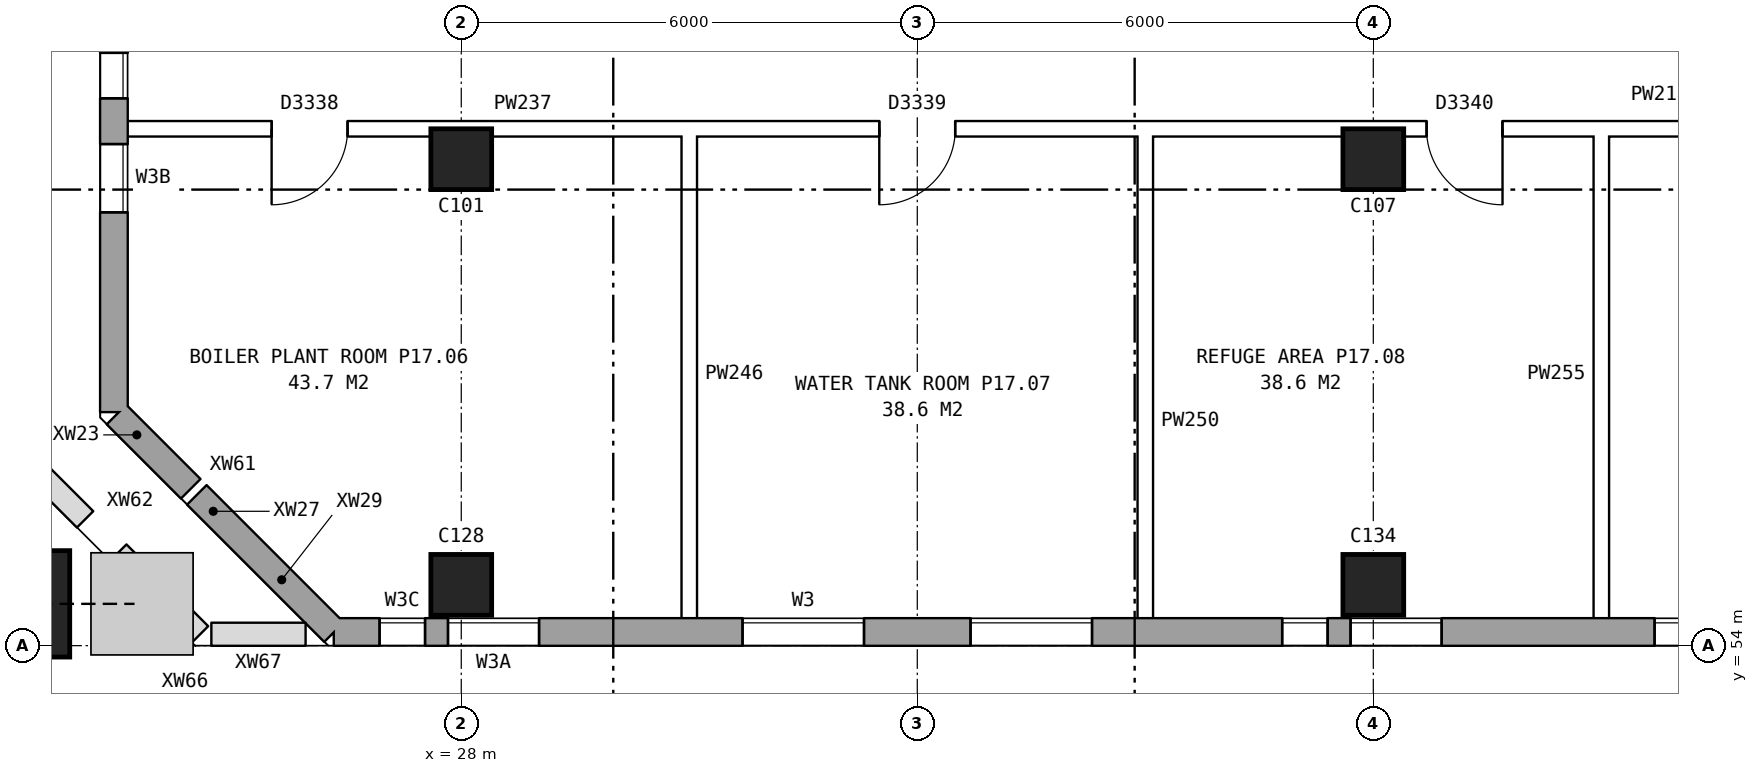
"""IFC4 building model, lengths in metres.
Left out: names, types, materials, properties, quantities, classifications, styles, units other than length and angle.
Written with IfcOpenShell. Run it as: python <this file> out.ifc"""

import sys

from ifc_helpers import new_model, si_unit, direction, frame, frame_2d, origin, origin_2d, place, context, subcontext, project, spatial, rectangle, hollow_rectangle, extrude, element, fill, save


model = new_model("IFC4")
c1 = context("Model", 3, precision=1e-05, world=origin(), true_north=direction((0.0, 1.0)))
c2 = subcontext(c1, "Body", "Model", "MODEL_VIEW")
j1 = project(units=[si_unit("LENGTHUNIT", "METRE"), si_unit("PLANEANGLEUNIT", "RADIAN")], contexts=[c1])
p1 = place(None, origin())
s1 = spatial("IfcSite", under=j1, at=p1, CompositionType="ELEMENT")
p2 = place(p1, origin())
s2 = spatial("IfcBuilding", under=s1, at=p2, CompositionType="ELEMENT")
p3 = place(p2, frame((0.0, 0.0, 62.9)))
s3 = spatial("IfcBuildingStorey", under=s2, at=p3, CompositionType="ELEMENT", Elevation=62.9)
for number, where, z_axis, x_axis in (
    (1, (28.0, 54.8, 0.0), (0.0, 0.0, 1.0), (1.0, 0.0, 0.0)),
    (2, (28.0, 60.4, 0.0), (0.0, 0.0, 1.0), (1.0, 0.0, 0.0)),
    (3, (40.0, 54.8, 0.0), (0.0, 0.0, 1.0), (1.0, 0.0, 0.0)),
    (4, (40.0, 60.4, 0.0), (0.0, 0.0, 1.0), (1.0, 0.0, 0.0)),
):
    element("IfcColumn", number, at=place(p3, frame(where, z_axis=z_axis, x_axis=x_axis)), inside=s3, PredefinedType="COLUMN", context=c2, shape_type="SweptSolid", body=[
        extrude(rectangle(XDim=0.8, YDim=0.8, at=origin_2d()), origin(), (0.0, 0.0, 1.0), 4.2),
    ])
p4 = place(p3, frame((22.149, 54.55, 0.254), z_axis=(0.362471013714, 0.0, 0.931995045168), x_axis=(0.0, 1.0, 0.0)))
e5 = element("IfcColumn", 5, at=p4, inside=s3, PredefinedType="COLUMN", context=c2, shape_type="SweptSolid", body=[
    extrude(hollow_rectangle(XDim=1.4, YDim=1.4, WallThickness=0.075, at=origin_2d()), origin(), (0.0, 0.0, 1.0), 4.284),
])
p5 = place(p3, frame((23.465, 57.039, 0.0), z_axis=(0.0, 0.0, 1.0), x_axis=(0.707106781187, -0.707106781187, 0.0)))
e6 = element("IfcWall", 6, at=p5, inside=s3, PredefinedType="STANDARD", context=c2, shape_type="SweptSolid", body=[
    extrude(rectangle(XDim=0.753, YDim=0.36, at=frame_2d((0.376, 0.0))), origin(), (0.0, 0.0, 1.0), 4.2),
])
p6 = place(p3, frame((23.998, 56.507, 0.953), z_axis=(0.0, 0.0, 1.0), x_axis=(0.706911258792, -0.707302249532, 0.0)))
e7 = element("IfcWall", 7, at=p6, inside=s3, PredefinedType="STANDARD", context=c2, shape_type="SweptSolid", body=[
    extrude(rectangle(XDim=0.625, YDim=0.36, at=frame_2d((0.312, 0.0))), origin(), (0.0, 0.0, 1.0), 3.247),
])
p7 = place(p3, frame((24.522, 55.982, 0.0), z_axis=(0.0, 0.0, 1.0), x_axis=(0.70690569865, -0.707307806556, 0.0)))
e8 = element("IfcWall", 8, at=p7, inside=s3, PredefinedType="STANDARD", context=c2, shape_type="SweptSolid", body=[
    extrude(rectangle(XDim=0.607, YDim=0.36, at=frame_2d((0.304, 0.0))), origin(), (0.0, 0.0, 1.0), 3.397),
])
p8 = place(p3, frame((24.951, 55.553, 0.0), z_axis=(0.0, 0.0, 1.0), x_axis=(0.707169637916, -0.707043918869, 0.0)))
e9 = element("IfcWall", 9, at=p8, inside=s3, PredefinedType="STANDARD", context=c2, shape_type="SweptSolid", body=[
    extrude(rectangle(XDim=1.942, YDim=0.36, at=frame_2d((0.971, 0.0))), origin(), (0.0, 0.0, 1.0), 4.2),
])
p9 = place(p3, frame((26.325, 54.18, 0.0), z_axis=(0.0, 0.0, 1.0), x_axis=(1.0, 0.0, 0.0)))
e10 = element("IfcWall", 10, at=p9, inside=s3, PredefinedType="STANDARD", context=c2, shape_type="SweptSolid", body=[
    extrude(rectangle(XDim=46.601, YDim=0.36, at=frame_2d((23.3, 0.0))), origin(), (0.0, 0.0, 1.0), 4.2),
])
p10 = place(p9, frame((0.6, 0.0, 1.5)))
e11 = element("IfcOpeningElement", 11, at=p10, cuts=e10, PredefinedType="OPENING", context=c2, shape_type="SweptSolid", body=[
    extrude(rectangle(XDim=0.6, YDim=1.2, at=frame_2d((0.3, 0.6))), frame((0.0, 0.19, 0.0), z_axis=(0.0, -1.0, 0.0), x_axis=(1.0, 0.0, 0.0)), (0.0, 0.0, 1.0), 0.38),
])
p11 = place(p9, frame((5.375, 0.0, 1.5)))
e12 = element("IfcOpeningElement", 12, at=p11, cuts=e10, PredefinedType="OPENING", context=c2, shape_type="SweptSolid", body=[
    extrude(rectangle(XDim=1.6, YDim=1.2, at=frame_2d((0.8, 0.6))), frame((0.0, 0.19, 0.0), z_axis=(0.0, -1.0, 0.0), x_axis=(1.0, 0.0, 0.0)), (0.0, 0.0, 1.0), 0.38),
])
p12 = place(p9, frame((8.375, 0.0, 1.5)))
e13 = element("IfcOpeningElement", 13, at=p12, cuts=e10, PredefinedType="OPENING", context=c2, shape_type="SweptSolid", body=[
    extrude(rectangle(XDim=1.6, YDim=1.2, at=frame_2d((0.8, 0.6))), frame((0.0, 0.19, 0.0), z_axis=(0.0, -1.0, 0.0), x_axis=(1.0, 0.0, 0.0)), (0.0, 0.0, 1.0), 0.38),
])
p13 = place(p9, frame((12.475, 0.0, 1.5)))
e14 = element("IfcOpeningElement", 14, at=p13, cuts=e10, PredefinedType="OPENING", context=c2, shape_type="SweptSolid", body=[
    extrude(rectangle(XDim=0.6, YDim=1.2, at=frame_2d((0.3, 0.6))), frame((0.0, 0.19, 0.0), z_axis=(0.0, -1.0, 0.0), x_axis=(1.0, 0.0, 0.0)), (0.0, 0.0, 1.0), 0.38),
])
p14 = place(p9, frame((13.375, 0.0, 1.5)))
e15 = element("IfcOpeningElement", 15, at=p14, cuts=e10, PredefinedType="OPENING", context=c2, shape_type="SweptSolid", body=[
    extrude(rectangle(XDim=1.2, YDim=1.2, at=frame_2d((0.6, 0.6))), frame((0.0, 0.19, 0.0), z_axis=(0.0, -1.0, 0.0), x_axis=(1.0, 0.0, 0.0)), (0.0, 0.0, 1.0), 0.38),
])
p15 = place(p9, frame((17.375, 0.0, 1.5)))
e16 = element("IfcOpeningElement", 16, at=p15, cuts=e10, PredefinedType="OPENING", context=c2, shape_type="SweptSolid", body=[
    extrude(rectangle(XDim=1.6, YDim=1.2, at=frame_2d((0.8, 0.6))), frame((0.0, 0.19, 0.0), z_axis=(0.0, -1.0, 0.0), x_axis=(1.0, 0.0, 0.0)), (0.0, 0.0, 1.0), 0.38),
])
p16 = place(p9, frame((20.375, 0.0, 1.5)))
e17 = element("IfcOpeningElement", 17, at=p16, cuts=e10, PredefinedType="OPENING", context=c2, shape_type="SweptSolid", body=[
    extrude(rectangle(XDim=1.6, YDim=1.2, at=frame_2d((0.8, 0.6))), frame((0.0, 0.19, 0.0), z_axis=(0.0, -1.0, 0.0), x_axis=(1.0, 0.0, 0.0)), (0.0, 0.0, 1.0), 0.38),
])
p17 = place(p9, frame((19.275, 0.0, 1.5)))
e18 = element("IfcOpeningElement", 18, at=p17, cuts=e10, PredefinedType="OPENING", context=c2, shape_type="SweptSolid", body=[
    extrude(rectangle(XDim=0.6, YDim=1.2, at=frame_2d((0.3, 0.6))), frame((0.0, 0.19, 0.0), z_axis=(0.0, -1.0, 0.0), x_axis=(1.0, 0.0, 0.0)), (0.0, 0.0, 1.0), 0.38),
])
p18 = place(p9, frame((29.375, 0.0, 1.5)))
e19 = element("IfcOpeningElement", 19, at=p18, cuts=e10, PredefinedType="OPENING", context=c2, shape_type="SweptSolid", body=[
    extrude(rectangle(XDim=1.6, YDim=1.2, at=frame_2d((0.8, 0.6))), frame((0.0, 0.19, 0.0), z_axis=(0.0, -1.0, 0.0), x_axis=(1.0, 0.0, 0.0)), (0.0, 0.0, 1.0), 0.38),
])
p19 = place(p9, frame((32.375, 0.0, 1.5)))
e20 = element("IfcOpeningElement", 20, at=p19, cuts=e10, PredefinedType="OPENING", context=c2, shape_type="SweptSolid", body=[
    extrude(rectangle(XDim=1.6, YDim=1.2, at=frame_2d((0.8, 0.6))), frame((0.0, 0.19, 0.0), z_axis=(0.0, -1.0, 0.0), x_axis=(1.0, 0.0, 0.0)), (0.0, 0.0, 1.0), 0.38),
])
p20 = place(p9, frame((36.225, 0.0, 1.5)))
e21 = element("IfcOpeningElement", 21, at=p20, cuts=e10, PredefinedType="OPENING", context=c2, shape_type="SweptSolid", body=[
    extrude(rectangle(XDim=1.2, YDim=1.2, at=frame_2d((0.6, 0.6))), frame((0.0, 0.19, 0.0), z_axis=(0.0, -1.0, 0.0), x_axis=(1.0, 0.0, 0.0)), (0.0, 0.0, 1.0), 0.38),
])
p21 = place(p9, frame((43.275, 0.0, 1.5)))
e22 = element("IfcOpeningElement", 22, at=p21, cuts=e10, PredefinedType="OPENING", context=c2, shape_type="SweptSolid", body=[
    extrude(rectangle(XDim=0.6, YDim=1.2, at=frame_2d((0.3, 0.6))), frame((0.0, 0.19, 0.0), z_axis=(0.0, -1.0, 0.0), x_axis=(1.0, 0.0, 0.0)), (0.0, 0.0, 1.0), 0.38),
])
p22 = place(p9, frame((41.375, 0.0, 1.5)))
e23 = element("IfcOpeningElement", 23, at=p22, cuts=e10, PredefinedType="OPENING", context=c2, shape_type="SweptSolid", body=[
    extrude(rectangle(XDim=1.6, YDim=1.2, at=frame_2d((0.8, 0.6))), frame((0.0, 0.19, 0.0), z_axis=(0.0, -1.0, 0.0), x_axis=(1.0, 0.0, 0.0)), (0.0, 0.0, 1.0), 0.38),
])
p23 = place(p9, frame((44.175, 0.0, 1.5)))
e24 = element("IfcOpeningElement", 24, at=p23, cuts=e10, PredefinedType="OPENING", context=c2, shape_type="SweptSolid", body=[
    extrude(rectangle(XDim=1.2, YDim=1.2, at=frame_2d((0.6, 0.6))), frame((0.0, 0.19, 0.0), z_axis=(0.0, -1.0, 0.0), x_axis=(1.0, 0.0, 0.0)), (0.0, 0.0, 1.0), 0.38),
])
p24 = place(p9, frame((1.5, 0.0, 1.5)))
e25 = element("IfcOpeningElement", 25, at=p24, cuts=e10, PredefinedType="OPENING", context=c2, shape_type="SweptSolid", body=[
    extrude(rectangle(XDim=1.2, YDim=1.2, at=frame_2d((0.6, 0.6))), frame((0.0, 0.19, 0.0), z_axis=(0.0, -1.0, 0.0), x_axis=(1.0, 0.0, 0.0)), (0.0, 0.0, 1.0), 0.38),
])
p25 = place(p9, frame((24.375, 0.0, 1.5)))
e26 = element("IfcOpeningElement", 26, at=p25, cuts=e10, PredefinedType="OPENING", context=c2, shape_type="SweptSolid", body=[
    extrude(rectangle(XDim=0.9, YDim=1.2, at=frame_2d((0.45, 0.6))), frame((0.0, 0.19, 0.0), z_axis=(0.0, -1.0, 0.0), x_axis=(1.0, 0.0, 0.0)), (0.0, 0.0, 1.0), 0.38),
])
p26 = place(p3, frame((23.43, 82.925, 0.0), z_axis=(0.0, 0.0, 1.0), x_axis=(0.0, -1.0, 0.0)))
e27 = element("IfcWall", 27, at=p26, inside=s3, PredefinedType="STANDARD", context=c2, shape_type="SweptSolid", body=[
    extrude(rectangle(XDim=25.851, YDim=0.36, at=frame_2d((12.925, 0.0))), origin(), (0.0, 0.0, 1.0), 4.2),
])
p27 = place(p26, frame((1.625, 0.0, 1.5)))
e28 = element("IfcOpeningElement", 28, at=p27, cuts=e27, PredefinedType="OPENING", context=c2, shape_type="SweptSolid", body=[
    extrude(rectangle(XDim=1.6, YDim=1.2, at=frame_2d((0.8, 0.6))), frame((0.0, 0.19, 0.0), z_axis=(0.0, -1.0, 0.0), x_axis=(1.0, 0.0, 0.0)), (0.0, 0.0, 1.0), 0.38),
])
p28 = place(p26, frame((4.625, 0.0, 1.5)))
e29 = element("IfcOpeningElement", 29, at=p28, cuts=e27, PredefinedType="OPENING", context=c2, shape_type="SweptSolid", body=[
    extrude(rectangle(XDim=1.6, YDim=1.2, at=frame_2d((0.8, 0.6))), frame((0.0, 0.19, 0.0), z_axis=(0.0, -1.0, 0.0), x_axis=(1.0, 0.0, 0.0)), (0.0, 0.0, 1.0), 0.38),
])
p29 = place(p26, frame((8.775, 0.0, 1.5)))
e30 = element("IfcOpeningElement", 30, at=p29, cuts=e27, PredefinedType="OPENING", context=c2, shape_type="SweptSolid", body=[
    extrude(rectangle(XDim=0.6, YDim=1.2, at=frame_2d((0.3, 0.6))), frame((0.0, 0.19, 0.0), z_axis=(0.0, -1.0, 0.0), x_axis=(1.0, 0.0, 0.0)), (0.0, 0.0, 1.0), 0.38),
])
p30 = place(p26, frame((9.675, 0.0, 1.5)))
e31 = element("IfcOpeningElement", 31, at=p30, cuts=e27, PredefinedType="OPENING", context=c2, shape_type="SweptSolid", body=[
    extrude(rectangle(XDim=1.2, YDim=1.2, at=frame_2d((0.6, 0.6))), frame((0.0, 0.19, 0.0), z_axis=(0.0, -1.0, 0.0), x_axis=(1.0, 0.0, 0.0)), (0.0, 0.0, 1.0), 0.38),
])
p31 = place(p26, frame((13.625, 0.0, 1.5)))
e32 = element("IfcOpeningElement", 32, at=p31, cuts=e27, PredefinedType="OPENING", context=c2, shape_type="SweptSolid", body=[
    extrude(rectangle(XDim=1.6, YDim=1.2, at=frame_2d((0.8, 0.6))), frame((0.0, 0.19, 0.0), z_axis=(0.0, -1.0, 0.0), x_axis=(1.0, 0.0, 0.0)), (0.0, 0.0, 1.0), 0.38),
])
p32 = place(p26, frame((16.625, 0.0, 1.5)))
e33 = element("IfcOpeningElement", 33, at=p32, cuts=e27, PredefinedType="OPENING", context=c2, shape_type="SweptSolid", body=[
    extrude(rectangle(XDim=1.6, YDim=1.2, at=frame_2d((0.8, 0.6))), frame((0.0, 0.19, 0.0), z_axis=(0.0, -1.0, 0.0), x_axis=(1.0, 0.0, 0.0)), (0.0, 0.0, 1.0), 0.38),
])
p33 = place(p26, frame((21.125, 0.0, 1.5)))
e34 = element("IfcOpeningElement", 34, at=p33, cuts=e27, PredefinedType="OPENING", context=c2, shape_type="SweptSolid", body=[
    extrude(rectangle(XDim=0.6, YDim=1.2, at=frame_2d((0.3, 0.6))), frame((0.0, 0.19, 0.0), z_axis=(0.0, -1.0, 0.0), x_axis=(1.0, 0.0, 0.0)), (0.0, 0.0, 1.0), 0.38),
])
p34 = place(p26, frame((22.325, 0.0, 1.5)))
e35 = element("IfcOpeningElement", 35, at=p34, cuts=e27, PredefinedType="OPENING", context=c2, shape_type="SweptSolid", body=[
    extrude(rectangle(XDim=0.9, YDim=1.2, at=frame_2d((0.45, 0.6))), frame((0.0, 0.19, 0.0), z_axis=(0.0, -1.0, 0.0), x_axis=(1.0, 0.0, 0.0)), (0.0, 0.0, 1.0), 0.38),
])
p35 = place(p26, frame((15.525, 0.0, 1.5)))
e36 = element("IfcOpeningElement", 36, at=p35, cuts=e27, PredefinedType="OPENING", context=c2, shape_type="SweptSolid", body=[
    extrude(rectangle(XDim=0.6, YDim=1.2, at=frame_2d((0.3, 0.6))), frame((0.0, 0.19, 0.0), z_axis=(0.0, -1.0, 0.0), x_axis=(1.0, 0.0, 0.0)), (0.0, 0.0, 1.0), 0.38),
])
p36 = place(p3, frame((21.898, 56.814, 0.0), z_axis=(0.0, 0.0, 1.0), x_axis=(0.707106781187, -0.707106781187, 0.0)))
e37 = element("IfcWall", 37, at=p36, inside=s3, PredefinedType="PARAPET", context=c2, shape_type="SweptSolid", body=[
    extrude(rectangle(XDim=1.629, YDim=0.3, at=frame_2d((0.814, 0.0))), origin(), (0.0, 0.0, 1.0), 1.1),
])
p37 = place(p3, frame((23.489, 55.223, 0.0), z_axis=(0.0, 0.0, 1.0), x_axis=(0.707026341306, -0.707187211918, 0.0)))
e38 = element("IfcWall", 38, at=p37, inside=s3, PredefinedType="PARAPET", context=c2, shape_type="SweptSolid", body=[
    extrude(rectangle(XDim=1.518, YDim=0.3, at=frame_2d((0.759, 0.0))), origin(), (0.0, 0.0, 1.0), 1.1),
])
p38 = place(p3, frame((24.714, 54.15, 0.0), z_axis=(0.0, 0.0, 1.0), x_axis=(1.0, 0.0, 0.0)))
e39 = element("IfcWall", 39, at=p38, inside=s3, PredefinedType="PARAPET", context=c2, shape_type="SweptSolid", body=[
    extrude(rectangle(XDim=1.236, YDim=0.3, at=frame_2d((0.618, 0.0))), origin(), (0.0, 0.0, 1.0), 1.1),
])
p39 = place(p3, frame((23.49, 60.8, 0.0), z_axis=(0.0, 0.0, 1.0), x_axis=(1.0, 0.0, 0.0)))
e40 = element("IfcWall", 40, at=p39, inside=s3, PredefinedType="PARTITIONING", context=c2, shape_type="SweptSolid", body=[
    extrude(rectangle(XDim=20.97, YDim=0.2, at=frame_2d((10.485, 0.0))), origin(), (0.0, 0.0, 1.0), 4.2),
])
p40 = place(p39, frame((2.015, 0.0, 0.0)))
e41 = element("IfcOpeningElement", 41, at=p40, cuts=e40, PredefinedType="OPENING", context=c2, shape_type="SweptSolid", body=[
    extrude(rectangle(XDim=1.0, YDim=2.1, at=frame_2d((0.5, 1.05))), frame((0.0, 0.11, 0.0), z_axis=(0.0, -1.0, 0.0), x_axis=(1.0, 0.0, 0.0)), (0.0, 0.0, 1.0), 0.22),
])
p41 = place(p39, frame((10.01, 0.0, 0.0)))
e42 = element("IfcOpeningElement", 42, at=p41, cuts=e40, PredefinedType="OPENING", context=c2, shape_type="SweptSolid", body=[
    extrude(rectangle(XDim=1.0, YDim=2.1, at=frame_2d((0.5, 1.05))), frame((0.0, 0.11, 0.0), z_axis=(0.0, -1.0, 0.0), x_axis=(1.0, 0.0, 0.0)), (0.0, 0.0, 1.0), 0.22),
])
p42 = place(p39, frame((17.21, 0.0, 0.0)))
e43 = element("IfcOpeningElement", 43, at=p42, cuts=e40, PredefinedType="OPENING", context=c2, shape_type="SweptSolid", body=[
    extrude(rectangle(XDim=1.0, YDim=2.1, at=frame_2d((0.5, 1.05))), frame((0.0, 0.11, 0.0), z_axis=(0.0, -1.0, 0.0), x_axis=(1.0, 0.0, 0.0)), (0.0, 0.0, 1.0), 0.22),
])
for number, where, z_axis, x_axis in (
    (44, (31.0, 54.24, 0.0), (0.0, 0.0, 1.0), (0.0, 1.0, 0.0)),
    (45, (37.0, 54.24, 0.0), (0.0, 0.0, 1.0), (0.0, 1.0, 0.0)),
    (46, (43.0, 54.24, 0.0), (0.0, 0.0, 1.0), (0.0, 1.0, 0.0)),
):
    element("IfcWall", number, at=place(p3, frame(where, z_axis=z_axis, x_axis=x_axis)), inside=s3, PredefinedType="PARTITIONING", context=c2, shape_type="SweptSolid", body=[
        extrude(rectangle(XDim=6.66, YDim=0.2, at=frame_2d((3.33, 0.0))), origin(), (0.0, 0.0, 1.0), 4.2),
    ])
p43 = place(p10, origin())
e47 = element("IfcWindow", 47, at=p43, inside=s3, PartitioningType="DOUBLE_PANEL_HORIZONTAL", PredefinedType="WINDOW", context=c2, shape_type="SweptSolid", body=[
    extrude(rectangle(XDim=0.6, YDim=1.2, at=frame_2d((0.3, 0.6))), frame((0.0, 0.15, 0.0), z_axis=(0.0, -1.0, 0.0), x_axis=(1.0, 0.0, 0.0)), (0.0, 0.0, 1.0), 0.06),
])
fill(e11, e47)
p44 = place(p11, origin())
e48 = element("IfcWindow", 48, at=p44, inside=s3, PartitioningType="DOUBLE_PANEL_HORIZONTAL", PredefinedType="WINDOW", context=c2, shape_type="SweptSolid", body=[
    extrude(rectangle(XDim=1.6, YDim=1.2, at=frame_2d((0.8, 0.6))), frame((0.0, 0.15, 0.0), z_axis=(0.0, -1.0, 0.0), x_axis=(1.0, 0.0, 0.0)), (0.0, 0.0, 1.0), 0.06),
])
fill(e12, e48)
p45 = place(p12, origin())
e49 = element("IfcWindow", 49, at=p45, inside=s3, PartitioningType="DOUBLE_PANEL_HORIZONTAL", PredefinedType="WINDOW", context=c2, shape_type="SweptSolid", body=[
    extrude(rectangle(XDim=1.6, YDim=1.2, at=frame_2d((0.8, 0.6))), frame((0.0, 0.15, 0.0), z_axis=(0.0, -1.0, 0.0), x_axis=(1.0, 0.0, 0.0)), (0.0, 0.0, 1.0), 0.06),
])
fill(e13, e49)
p46 = place(p13, origin())
e50 = element("IfcWindow", 50, at=p46, inside=s3, PartitioningType="DOUBLE_PANEL_HORIZONTAL", PredefinedType="WINDOW", context=c2, shape_type="SweptSolid", body=[
    extrude(rectangle(XDim=0.6, YDim=1.2, at=frame_2d((0.3, 0.6))), frame((0.0, 0.15, 0.0), z_axis=(0.0, -1.0, 0.0), x_axis=(1.0, 0.0, 0.0)), (0.0, 0.0, 1.0), 0.06),
])
fill(e14, e50)
p47 = place(p14, origin())
e51 = element("IfcWindow", 51, at=p47, inside=s3, PartitioningType="DOUBLE_PANEL_HORIZONTAL", PredefinedType="WINDOW", context=c2, shape_type="SweptSolid", body=[
    extrude(rectangle(XDim=1.2, YDim=1.2, at=frame_2d((0.6, 0.6))), frame((0.0, 0.15, 0.0), z_axis=(0.0, -1.0, 0.0), x_axis=(1.0, 0.0, 0.0)), (0.0, 0.0, 1.0), 0.06),
])
fill(e15, e51)
p48 = place(p15, origin())
e52 = element("IfcWindow", 52, at=p48, inside=s3, PartitioningType="DOUBLE_PANEL_HORIZONTAL", PredefinedType="WINDOW", context=c2, shape_type="SweptSolid", body=[
    extrude(rectangle(XDim=1.6, YDim=1.2, at=frame_2d((0.8, 0.6))), frame((0.0, 0.15, 0.0), z_axis=(0.0, -1.0, 0.0), x_axis=(1.0, 0.0, 0.0)), (0.0, 0.0, 1.0), 0.06),
])
fill(e16, e52)
p49 = place(p33, origin())
e53 = element("IfcWindow", 53, at=p49, inside=s3, PartitioningType="DOUBLE_PANEL_HORIZONTAL", PredefinedType="WINDOW", context=c2, shape_type="SweptSolid", body=[
    extrude(rectangle(XDim=0.6, YDim=1.2, at=frame_2d((0.3, 0.6))), frame((0.0, 0.15, 0.0), z_axis=(0.0, -1.0, 0.0), x_axis=(1.0, 0.0, 0.0)), (0.0, 0.0, 1.0), 0.06),
])
fill(e34, e53)
p50 = place(p34, origin())
e54 = element("IfcWindow", 54, at=p50, inside=s3, PartitioningType="DOUBLE_PANEL_HORIZONTAL", PredefinedType="WINDOW", context=c2, shape_type="SweptSolid", body=[
    extrude(rectangle(XDim=0.9, YDim=1.2, at=frame_2d((0.45, 0.6))), frame((0.0, 0.15, 0.0), z_axis=(0.0, -1.0, 0.0), x_axis=(1.0, 0.0, 0.0)), (0.0, 0.0, 1.0), 0.06),
])
fill(e35, e54)
p51 = place(p40, frame((1.0, 0.0, 0.0), z_axis=(0.0, 0.0, 1.0), x_axis=(-1.0, 0.0, 0.0)))
e55 = element("IfcDoor", 55, at=p51, inside=s3, OperationType="SINGLE_SWING_RIGHT", PredefinedType="DOOR", context=c2, shape_type="SweptSolid", body=[
    extrude(rectangle(XDim=1.0, YDim=2.1, at=frame_2d((0.5, 1.05))), frame((0.0, 0.025, 0.0), z_axis=(0.0, -1.0, 0.0), x_axis=(1.0, 0.0, 0.0)), (0.0, 0.0, 1.0), 0.05),
])
fill(e41, e55)
p52 = place(p41, frame((1.0, 0.0, 0.0), z_axis=(0.0, 0.0, 1.0), x_axis=(-1.0, 0.0, 0.0)))
e56 = element("IfcDoor", 56, at=p52, inside=s3, OperationType="SINGLE_SWING_RIGHT", PredefinedType="DOOR", context=c2, shape_type="SweptSolid", body=[
    extrude(rectangle(XDim=1.0, YDim=2.1, at=frame_2d((0.5, 1.05))), frame((0.0, 0.025, 0.0), z_axis=(0.0, -1.0, 0.0), x_axis=(1.0, 0.0, 0.0)), (0.0, 0.0, 1.0), 0.05),
])
fill(e42, e56)
p53 = place(p42, frame((1.0, 0.0, 0.0), z_axis=(0.0, 0.0, 1.0), x_axis=(-1.0, 0.0, 0.0)))
e57 = element("IfcDoor", 57, at=p53, inside=s3, OperationType="SINGLE_SWING_LEFT", PredefinedType="DOOR", context=c2, shape_type="SweptSolid", body=[
    extrude(rectangle(XDim=1.0, YDim=2.1, at=frame_2d((0.5, 1.05))), frame((0.0, 0.025, 0.0), z_axis=(0.0, -1.0, 0.0), x_axis=(1.0, 0.0, 0.0)), (0.0, 0.0, 1.0), 0.05),
])
fill(e43, e57)
p54 = place(p24, origin())
e58 = element("IfcWindow", 58, at=p54, inside=s3, PartitioningType="DOUBLE_PANEL_HORIZONTAL", PredefinedType="WINDOW", context=c2, shape_type="SweptSolid", body=[
    extrude(rectangle(XDim=1.2, YDim=1.2, at=frame_2d((0.6, 0.6))), frame((0.0, 0.15, 0.0), z_axis=(0.0, -1.0, 0.0), x_axis=(1.0, 0.0, 0.0)), (0.0, 0.0, 1.0), 0.06),
])
fill(e25, e58)
save(model, sys.argv[1])
